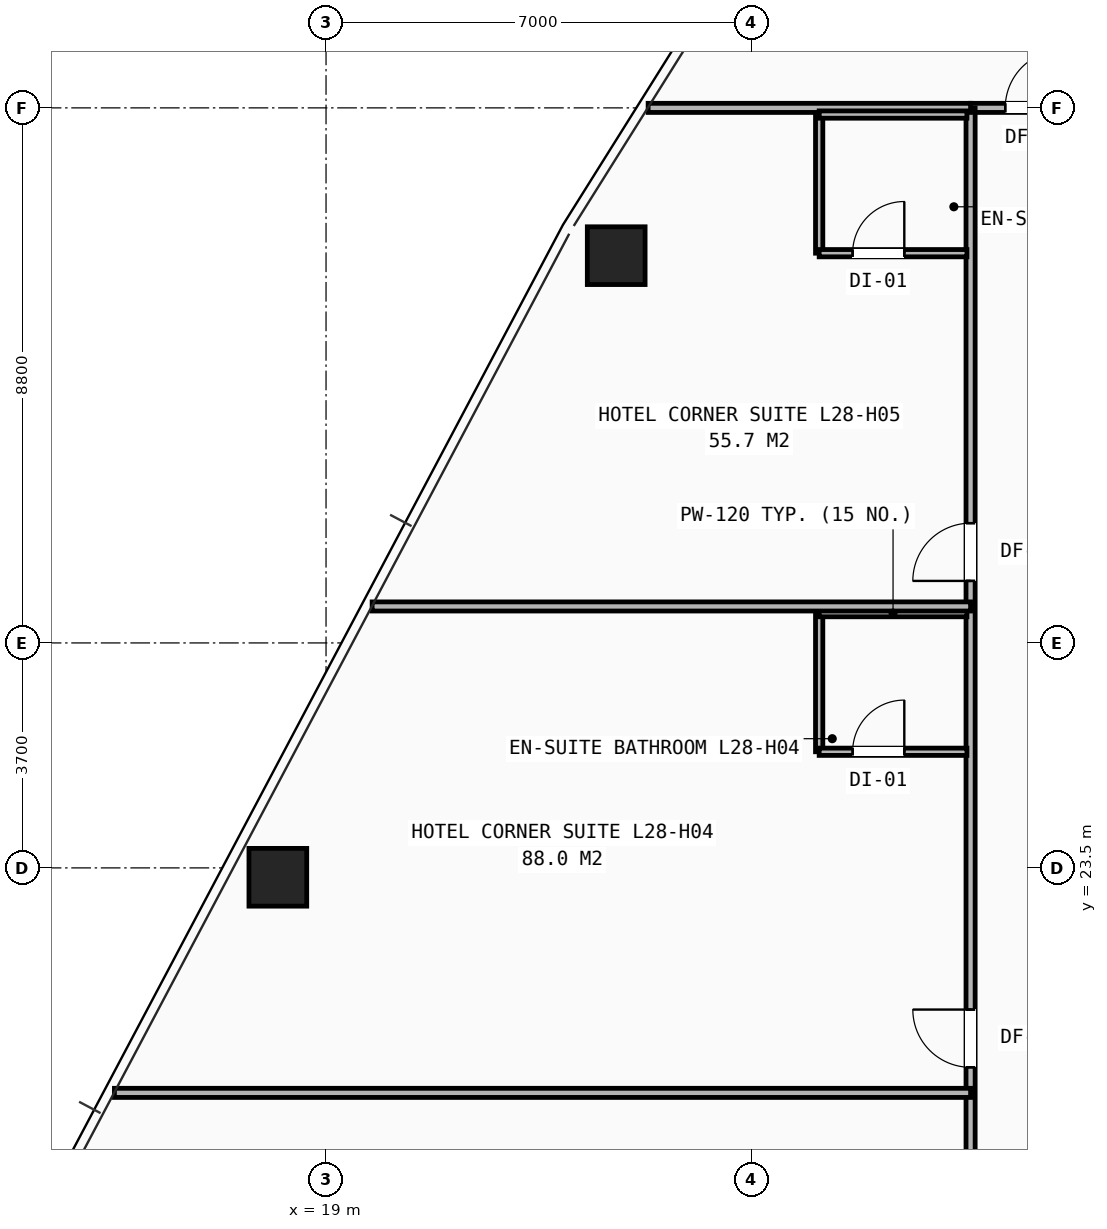
"""IFC4 building model, lengths in metres.
Left out: names, types, materials, properties, quantities, classifications, styles, units other than length and angle.
Written with IfcOpenShell. Run it as: python <this file> out.ifc"""

import sys

from ifc_helpers import new_model, si_unit, direction, frame, frame_2d, origin, origin_2d, place, context, subcontext, project, spatial, rectangle, hollow_rectangle, extrude, element, fill, save


model = new_model("IFC4")
c1 = context("Model", 3, precision=1e-05, world=origin(), true_north=direction((0.0, 1.0)))
c2 = subcontext(c1, "Body", "Model", "MODEL_VIEW")
j1 = project(units=[si_unit("LENGTHUNIT", "METRE"), si_unit("PLANEANGLEUNIT", "RADIAN")], contexts=[c1])
p1 = place(None, origin())
s1 = spatial("IfcSite", under=j1, at=p1, CompositionType="ELEMENT")
p2 = place(p1, origin())
s2 = spatial("IfcBuilding", under=s1, at=p2, CompositionType="ELEMENT")
p3 = place(p2, frame((0.0, 0.0, 99.0)))
s3 = spatial("IfcBuildingStorey", under=s2, at=p3, CompositionType="ELEMENT", Elevation=99.0)
for number, where, z_axis, x_axis in (
    (1, (23.772, 33.569, 0.0), (0.0, 0.0, 1.0), (1.0, 0.0, 0.0)),
    (2, (18.208, 23.346, 0.0), (0.0, 0.0, 1.0), (1.0, 0.0, 0.0)),
):
    element("IfcColumn", number, at=place(p3, frame(where, z_axis=z_axis, x_axis=x_axis)), inside=s3, PredefinedType="COLUMN", context=c2, shape_type="SweptSolid", body=[
        extrude(hollow_rectangle(XDim=0.95, YDim=0.95, WallThickness=0.065, at=origin_2d()), origin(), (0.0, 0.0, 1.0), 3.2),
    ])
p4 = place(p3, frame((29.6, 36.0, 0.0), z_axis=(0.0, 0.0, 1.0), x_axis=(1.0, 0.0, 0.0)))
e3 = element("IfcWall", 3, at=p4, inside=s3, PredefinedType="PARTITIONING", context=c2, shape_type="SweptSolid", body=[
    extrude(rectangle(XDim=9.65, YDim=0.15, at=frame_2d((4.825, 0.0))), origin(), (0.0, 0.0, 1.0), 2.503),
])
p5 = place(p4, frame((0.57, 0.0, 0.0)))
e4 = element("IfcOpeningElement", 4, at=p5, cuts=e3, PredefinedType="OPENING", context=c2, shape_type="SweptSolid", body=[
    extrude(rectangle(XDim=0.95, YDim=2.1, at=frame_2d((0.475, 1.05))), frame((0.0, 0.085, 0.0), z_axis=(0.0, -1.0, 0.0), x_axis=(1.0, 0.0, 0.0)), (0.0, 0.0, 1.0), 0.17),
])
p6 = place(p4, frame((8.02, 0.0, 0.0)))
e5 = element("IfcOpeningElement", 5, at=p6, cuts=e3, PredefinedType="OPENING", context=c2, shape_type="SweptSolid", body=[
    extrude(rectangle(XDim=0.95, YDim=2.1, at=frame_2d((0.475, 1.05))), frame((0.0, 0.085, 0.0), z_axis=(0.0, -1.0, 0.0), x_axis=(1.0, 0.0, 0.0)), (0.0, 0.0, 1.0), 0.17),
])
p7 = place(p3, frame((29.6, 14.1, 0.0), z_axis=(0.0, 0.0, 1.0), x_axis=(0.0, 1.0, 0.0)))
e6 = element("IfcWall", 6, at=p7, inside=s3, PredefinedType="PARTITIONING", context=c2, shape_type="SweptSolid", body=[
    extrude(rectangle(XDim=21.9, YDim=0.15, at=frame_2d((10.95, 0.0))), origin(), (0.0, 0.0, 1.0), 2.181),
])
p8 = place(p7, frame((0.42, 0.0, 0.0)))
e7 = element("IfcOpeningElement", 7, at=p8, cuts=e6, PredefinedType="OPENING", context=c2, shape_type="SweptSolid", body=[
    extrude(rectangle(XDim=0.95, YDim=2.1, at=frame_2d((0.475, 1.05))), frame((0.0, 0.085, 0.0), z_axis=(0.0, -1.0, 0.0), x_axis=(1.0, 0.0, 0.0)), (0.0, 0.0, 1.0), 0.17),
])
p9 = place(p7, frame((6.12, 0.0, 0.0)))
e8 = element("IfcOpeningElement", 8, at=p9, cuts=e6, PredefinedType="OPENING", context=c2, shape_type="SweptSolid", body=[
    extrude(rectangle(XDim=0.95, YDim=2.1, at=frame_2d((0.475, 1.05))), frame((0.0, 0.085, 0.0), z_axis=(0.0, -1.0, 0.0), x_axis=(1.0, 0.0, 0.0)), (0.0, 0.0, 1.0), 0.17),
])
p10 = place(p7, frame((14.12, 0.0, 0.0)))
e9 = element("IfcOpeningElement", 9, at=p10, cuts=e6, PredefinedType="OPENING", context=c2, shape_type="SweptSolid", body=[
    extrude(rectangle(XDim=0.95, YDim=2.1, at=frame_2d((0.475, 1.05))), frame((0.0, 0.085, 0.0), z_axis=(0.0, -1.0, 0.0), x_axis=(1.0, 0.0, 0.0)), (0.0, 0.0, 1.0), 0.17),
])
p11 = place(p3, frame((24.297, 36.0, 0.0), z_axis=(0.0, 0.0, 1.0), x_axis=(1.0, 0.0, 0.0)))
e10 = element("IfcWall", 10, at=p11, inside=s3, PredefinedType="PARTITIONING", context=c2, shape_type="SweptSolid", body=[
    extrude(rectangle(XDim=5.303, YDim=0.15, at=frame_2d((2.651, 0.0))), origin(), (0.0, 0.0, 1.0), 2.258),
])
p12 = place(p3, frame((15.52, 19.8, 0.0), z_axis=(0.0, 0.0, 1.0), x_axis=(1.0, 0.0, 0.0)))
e11 = element("IfcWall", 11, at=p12, inside=s3, PredefinedType="PARTITIONING", context=c2, shape_type="SweptSolid", body=[
    extrude(rectangle(XDim=14.08, YDim=0.15, at=frame_2d((7.04, 0.0))), origin(), (0.0, 0.0, 1.0), 2.258),
])
p13 = place(p3, frame((27.11, 25.41, 0.0), z_axis=(0.0, 0.0, 1.0), x_axis=(0.0, 1.0, 0.0)))
e12 = element("IfcWall", 12, at=p13, inside=s3, PredefinedType="PARTITIONING", context=c2, shape_type="SweptSolid", body=[
    extrude(rectangle(XDim=2.28, YDim=0.12, at=frame_2d((1.14, 0.0))), origin(), (0.0, 0.0, 1.0), 2.97),
])
p14 = place(p3, frame((27.11, 25.41, 0.0), z_axis=(0.0, 0.0, 1.0), x_axis=(1.0, 0.0, 0.0)))
e13 = element("IfcWall", 13, at=p14, inside=s3, PredefinedType="PARTITIONING", context=c2, shape_type="SweptSolid", body=[
    extrude(rectangle(XDim=2.43, YDim=0.12, at=frame_2d((1.215, 0.0))), origin(), (0.0, 0.0, 1.0), 2.97),
])
p15 = place(p14, frame((0.55, 0.0, 0.0)))
e14 = element("IfcOpeningElement", 14, at=p15, cuts=e13, PredefinedType="OPENING", context=c2, shape_type="SweptSolid", body=[
    extrude(rectangle(XDim=0.85, YDim=2.05, at=frame_2d((0.425, 1.025))), frame((0.0, 0.07, 0.0), z_axis=(0.0, -1.0, 0.0), x_axis=(1.0, 0.0, 0.0)), (0.0, 0.0, 1.0), 0.14),
])
p16 = place(p3, frame((27.11, 27.69, 0.0), z_axis=(0.0, 0.0, 1.0), x_axis=(1.0, 0.0, 0.0)))
e15 = element("IfcWall", 15, at=p16, inside=s3, PredefinedType="PARTITIONING", context=c2, shape_type="SweptSolid", body=[
    extrude(rectangle(XDim=2.43, YDim=0.12, at=frame_2d((1.215, 0.0))), origin(), (0.0, 0.0, 1.0), 2.97),
])
p17 = place(p3, frame((19.758, 27.8, 0.0), z_axis=(0.0, 0.0, 1.0), x_axis=(1.0, 0.0, 0.0)))
e16 = element("IfcWall", 16, at=p17, inside=s3, PredefinedType="PARTITIONING", context=c2, shape_type="SweptSolid", body=[
    extrude(rectangle(XDim=9.842, YDim=0.15, at=frame_2d((4.921, 0.0))), origin(), (0.0, 0.0, 1.0), 2.258),
])
p18 = place(p3, frame((27.11, 33.61, 0.0), z_axis=(0.0, 0.0, 1.0), x_axis=(0.0, 1.0, 0.0)))
e17 = element("IfcWall", 17, at=p18, inside=s3, PredefinedType="PARTITIONING", context=c2, shape_type="SweptSolid", body=[
    extrude(rectangle(XDim=2.28, YDim=0.12, at=frame_2d((1.14, 0.0))), origin(), (0.0, 0.0, 1.0), 2.97),
])
p19 = place(p3, frame((27.11, 33.61, 0.0), z_axis=(0.0, 0.0, 1.0), x_axis=(1.0, 0.0, 0.0)))
e18 = element("IfcWall", 18, at=p19, inside=s3, PredefinedType="PARTITIONING", context=c2, shape_type="SweptSolid", body=[
    extrude(rectangle(XDim=2.43, YDim=0.12, at=frame_2d((1.215, 0.0))), origin(), (0.0, 0.0, 1.0), 2.503),
])
p20 = place(p19, frame((0.55, 0.0, 0.0)))
e19 = element("IfcOpeningElement", 19, at=p20, cuts=e18, PredefinedType="OPENING", context=c2, shape_type="SweptSolid", body=[
    extrude(rectangle(XDim=0.85, YDim=2.05, at=frame_2d((0.425, 1.025))), frame((0.0, 0.07, 0.0), z_axis=(0.0, -1.0, 0.0), x_axis=(1.0, 0.0, 0.0)), (0.0, 0.0, 1.0), 0.14),
])
p21 = place(p3, frame((27.11, 35.89, 0.0), z_axis=(0.0, 0.0, 1.0), x_axis=(1.0, 0.0, 0.0)))
e20 = element("IfcWall", 20, at=p21, inside=s3, PredefinedType="PARTITIONING", context=c2, shape_type="SweptSolid", body=[
    extrude(rectangle(XDim=2.43, YDim=0.12, at=frame_2d((1.215, 0.0))), origin(), (0.0, 0.0, 1.0), 2.503),
])
p22 = place(p9, origin())
e21 = element("IfcDoor", 21, at=p22, inside=s3, OperationType="SINGLE_SWING_RIGHT", PredefinedType="DOOR", context=c2, shape_type="SweptSolid", body=[
    extrude(rectangle(XDim=0.95, YDim=2.1, at=frame_2d((0.475, 1.05))), frame((0.0, 0.025, 0.0), z_axis=(0.0, -1.0, 0.0), x_axis=(1.0, 0.0, 0.0)), (0.0, 0.0, 1.0), 0.05),
])
fill(e8, e21)
p23 = place(p15, origin())
e22 = element("IfcDoor", 22, at=p23, inside=s3, OperationType="SINGLE_SWING_RIGHT", PredefinedType="DOOR", context=c2, shape_type="SweptSolid", body=[
    extrude(rectangle(XDim=0.85, YDim=2.05, at=frame_2d((0.425, 1.025))), frame((0.0, 0.025, 0.0), z_axis=(0.0, -1.0, 0.0), x_axis=(1.0, 0.0, 0.0)), (0.0, 0.0, 1.0), 0.05),
])
fill(e14, e22)
p24 = place(p10, origin())
e23 = element("IfcDoor", 23, at=p24, inside=s3, OperationType="SINGLE_SWING_LEFT", PredefinedType="DOOR", context=c2, shape_type="SweptSolid", body=[
    extrude(rectangle(XDim=0.95, YDim=2.1, at=frame_2d((0.475, 1.05))), frame((0.0, 0.025, 0.0), z_axis=(0.0, -1.0, 0.0), x_axis=(1.0, 0.0, 0.0)), (0.0, 0.0, 1.0), 0.05),
])
fill(e9, e23)
p25 = place(p20, origin())
e24 = element("IfcDoor", 24, at=p25, inside=s3, OperationType="SINGLE_SWING_RIGHT", PredefinedType="DOOR", context=c2, shape_type="SweptSolid", body=[
    extrude(rectangle(XDim=0.85, YDim=2.05, at=frame_2d((0.425, 1.025))), frame((0.0, 0.025, 0.0), z_axis=(0.0, -1.0, 0.0), x_axis=(1.0, 0.0, 0.0)), (0.0, 0.0, 1.0), 0.05),
])
fill(e19, e24)
p26 = place(p5, origin())
e25 = element("IfcDoor", 25, at=p26, inside=s3, OperationType="SINGLE_SWING_RIGHT", PredefinedType="DOOR", context=c2, shape_type="SweptSolid", body=[
    extrude(rectangle(XDim=0.95, YDim=2.1, at=frame_2d((0.475, 1.05))), frame((0.0, 0.025, 0.0), z_axis=(0.0, -1.0, 0.0), x_axis=(1.0, 0.0, 0.0)), (0.0, 0.0, 1.0), 0.05),
])
fill(e4, e25)
save(model, sys.argv[1])
